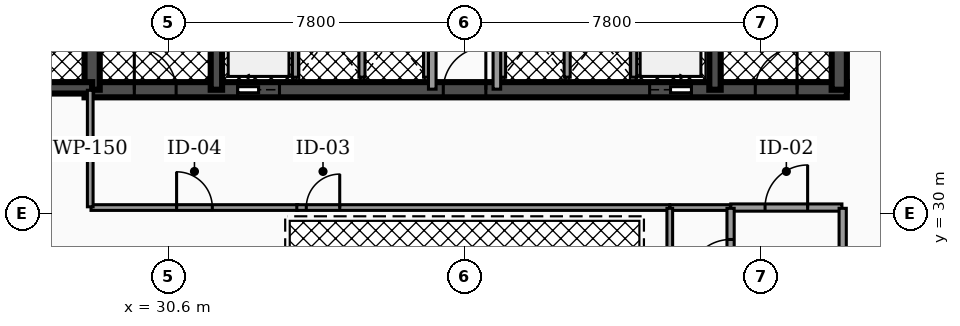
"""IFC4 building model, lengths in metres.
Left out: names, types, materials, properties, quantities, classifications, styles, units other than length and angle.
Written with IfcOpenShell. Run it as: python <this file> out.ifc"""

import sys

from ifc_helpers import new_model, si_unit, direction, frame, frame_2d, origin, place, context, subcontext, project, spatial, rectangle, extrude, element, fill, save


model = new_model("IFC4")
c1 = context("Model", 3, precision=1e-05, world=origin(), true_north=direction((0.0, 1.0)))
c2 = subcontext(c1, "Body", "Model", "MODEL_VIEW")
j1 = project(units=[si_unit("LENGTHUNIT", "METRE"), si_unit("PLANEANGLEUNIT", "RADIAN")], contexts=[c1])
p1 = place(None, origin())
s1 = spatial("IfcSite", under=j1, at=p1, CompositionType="ELEMENT")
p2 = place(p1, origin())
s2 = spatial("IfcBuilding", under=s1, at=p2, CompositionType="ELEMENT")
p3 = place(p2, frame((0.0, 0.0, 76.5)))
s3 = spatial("IfcBuildingStorey", under=s2, at=p3, CompositionType="ELEMENT", Elevation=76.5)
p4 = place(p3, frame((28.4, 33.25, 0.0), z_axis=(0.0, 0.0, 1.0), x_axis=(1.0, 0.0, 0.0)))
e1 = element("IfcWall", 1, at=p4, inside=s3, PredefinedType="SHEAR", context=c2, shape_type="SweptSolid", body=[
    extrude(rectangle(XDim=20.06, YDim=0.4, at=frame_2d((10.03, 0.0))), origin(), (0.0, 0.0, 1.0), 3.82),
])
p5 = place(p4, frame((4.03, 0.0, 0.0)))
e2 = element("IfcOpeningElement", 2, at=p5, cuts=e1, PredefinedType="OPENING", context=c2, shape_type="SweptSolid", body=[
    extrude(rectangle(XDim=1.1, YDim=2.15, at=frame_2d((0.55, 1.075))), frame((0.0, 0.21, 0.0), z_axis=(0.0, -1.0, 0.0), x_axis=(1.0, 0.0, 0.0)), (0.0, 0.0, 1.0), 0.42),
])
p6 = place(p4, frame((14.87, 0.0, 0.0)))
e3 = element("IfcOpeningElement", 3, at=p6, cuts=e1, PredefinedType="OPENING", context=c2, shape_type="SweptSolid", body=[
    extrude(rectangle(XDim=1.1, YDim=2.15, at=frame_2d((0.55, 1.075))), frame((0.0, 0.21, 0.0), z_axis=(0.0, -1.0, 0.0), x_axis=(1.0, 0.0, 0.0)), (0.0, 0.0, 1.0), 0.42),
])
p7 = place(p4, frame((1.31, 0.0, 0.0)))
e4 = element("IfcOpeningElement", 4, at=p7, cuts=e1, PredefinedType="OPENING", context=c2, shape_type="SweptSolid", body=[
    extrude(rectangle(XDim=1.1, YDim=2.2, at=frame_2d((0.55, 1.1))), frame((0.0, 0.21, 0.0), z_axis=(0.0, -1.0, 0.0), x_axis=(1.0, 0.0, 0.0)), (0.0, 0.0, 1.0), 0.42),
])
p8 = place(p4, frame((9.44, 0.0, 0.0)))
e5 = element("IfcOpeningElement", 5, at=p8, cuts=e1, PredefinedType="OPENING", context=c2, shape_type="SweptSolid", body=[
    extrude(rectangle(XDim=1.12, YDim=2.05, at=frame_2d((0.56, 1.025))), frame((0.0, 0.21, 0.0), z_axis=(0.0, -1.0, 0.0), x_axis=(1.0, 0.0, 0.0)), (0.0, 0.0, 1.0), 0.42),
])
p9 = place(p4, frame((17.65, 0.0, 0.0)))
e6 = element("IfcOpeningElement", 6, at=p9, cuts=e1, PredefinedType="OPENING", context=c2, shape_type="SweptSolid", body=[
    extrude(rectangle(XDim=1.1, YDim=2.2, at=frame_2d((0.55, 1.1))), frame((0.0, 0.21, 0.0), z_axis=(0.0, -1.0, 0.0), x_axis=(1.0, 0.0, 0.0)), (0.0, 0.0, 1.0), 0.42),
])
p10 = place(p3, frame((28.6, 33.25, 0.0), z_axis=(0.0, 0.0, 1.0), x_axis=(0.0, 1.0, 0.0)))
e7 = element("IfcWall", 7, at=p10, inside=s3, PredefinedType="SHEAR", context=c2, shape_type="SweptSolid", body=[
    extrude(rectangle(XDim=10.2, YDim=0.4, at=frame_2d((5.1, 0.0))), origin(), (0.0, 0.0, 1.0), 3.82),
])
for number, where, z_axis, x_axis in (
    (8, (31.87, 33.25, 0.0), (0.0, 0.0, 1.0), (0.0, 1.0, 0.0)),
    (9, (44.99, 33.25, 0.0), (0.0, 0.0, 1.0), (0.0, 1.0, 0.0)),
):
    element("IfcWall", number, at=place(p3, frame(where, z_axis=z_axis, x_axis=x_axis)), inside=s3, PredefinedType="SHEAR", context=c2, shape_type="SweptSolid", body=[
        extrude(rectangle(XDim=10.2, YDim=0.3, at=frame_2d((5.1, 0.0))), origin(), (0.0, 0.0, 1.0), 3.82),
    ])
p11 = place(p3, frame((48.26, 33.25, 0.0), z_axis=(0.0, 0.0, 1.0), x_axis=(0.0, 1.0, 0.0)))
e10 = element("IfcWall", 10, at=p11, inside=s3, PredefinedType="SHEAR", context=c2, shape_type="SweptSolid", body=[
    extrude(rectangle(XDim=10.2, YDim=0.4, at=frame_2d((5.1, 0.0))), origin(), (0.0, 0.0, 1.0), 3.82),
])
p12 = place(p3, frame((25.08, 33.3, 0.0), z_axis=(0.0, 0.0, 1.0), x_axis=(1.0, 0.0, 0.0)))
e11 = element("IfcWall", 11, at=p12, inside=s3, PredefinedType="SHEAR", context=c2, shape_type="SweptSolid", body=[
    extrude(rectangle(XDim=3.52, YDim=0.3, at=frame_2d((1.76, 0.0))), origin(), (0.0, 0.0, 1.0), 3.82),
])
p13 = place(p12, frame((1.335, 0.0, 0.0)))
e12 = element("IfcOpeningElement", 12, at=p13, cuts=e11, PredefinedType="OPENING", context=c2, shape_type="SweptSolid", body=[
    extrude(rectangle(XDim=0.95, YDim=2.2, at=frame_2d((0.475, 1.1))), frame((0.0, 0.16, 0.0), z_axis=(0.0, -1.0, 0.0), x_axis=(1.0, 0.0, 0.0)), (0.0, 0.0, 1.0), 0.32),
])
for number, where, z_axis, x_axis in (
    (13, (33.95, 33.58, 0.0), (0.0, 0.0, 1.0), (0.0, 1.0, 0.0)),
    (14, (42.85, 33.58, 0.0), (0.0, 0.0, 1.0), (0.0, 1.0, 0.0)),
):
    element("IfcWall", number, at=place(p3, frame(where, z_axis=z_axis, x_axis=x_axis)), inside=s3, PredefinedType="SOLIDWALL", context=c2, shape_type="SweptSolid", body=[
        extrude(rectangle(XDim=2.45, YDim=0.16, at=frame_2d((1.225, 0.0))), origin(), (0.0, 0.0, 1.0), 2.792),
    ])
for number, where, z_axis, x_axis in (
    (15, (35.7, 33.58, 0.0), (0.0, 0.0, 1.0), (0.0, 1.0, 0.0)),
    (16, (37.4, 33.58, 0.0), (0.0, 0.0, 1.0), (0.0, 1.0, 0.0)),
    (17, (39.4, 33.58, 0.0), (0.0, 0.0, 1.0), (0.0, 1.0, 0.0)),
    (18, (41.1, 33.58, 0.0), (0.0, 0.0, 1.0), (0.0, 1.0, 0.0)),
):
    element("IfcWall", number, at=place(p3, frame(where, z_axis=z_axis, x_axis=x_axis)), inside=s3, PredefinedType="SOLIDWALL", context=c2, shape_type="SweptSolid", body=[
        extrude(rectangle(XDim=2.25, YDim=0.16, at=frame_2d((1.125, 0.0))), origin(), (0.0, 0.0, 1.0), 2.792),
    ])
p14 = place(p3, frame((37.55, 33.265, 0.0), z_axis=(0.0, 0.0, 1.0), x_axis=(0.0, 1.0, 0.0)))
e19 = element("IfcWall", 19, at=p14, inside=s3, PredefinedType="PARTITIONING", context=c2, shape_type="SweptSolid", body=[
    extrude(rectangle(XDim=4.265, YDim=0.2, at=frame_2d((2.133, 0.0))), origin(), (0.0, 0.0, 1.0), 2.777),
])
p15 = place(p14, frame((3.093, 0.0, 0.0)))
e20 = element("IfcOpeningElement", 20, at=p15, cuts=e19, PredefinedType="OPENING", context=c2, shape_type="SweptSolid", body=[
    extrude(rectangle(XDim=0.88, YDim=2.05, at=frame_2d((0.44, 1.025))), frame((0.0, 0.11, 0.0), z_axis=(0.0, -1.0, 0.0), x_axis=(1.0, 0.0, 0.0)), (0.0, 0.0, 1.0), 0.22),
])
p16 = place(p3, frame((39.25, 33.265, 0.0), z_axis=(0.0, 0.0, 1.0), x_axis=(0.0, 1.0, 0.0)))
e21 = element("IfcWall", 21, at=p16, inside=s3, PredefinedType="PARTITIONING", context=c2, shape_type="SweptSolid", body=[
    extrude(rectangle(XDim=4.265, YDim=0.2, at=frame_2d((2.133, 0.0))), origin(), (0.0, 0.0, 1.0), 2.777),
])
p17 = place(p16, frame((3.093, 0.0, 0.0)))
e22 = element("IfcOpeningElement", 22, at=p17, cuts=e21, PredefinedType="OPENING", context=c2, shape_type="SweptSolid", body=[
    extrude(rectangle(XDim=0.88, YDim=2.05, at=frame_2d((0.44, 1.025))), frame((0.0, 0.11, 0.0), z_axis=(0.0, -1.0, 0.0), x_axis=(1.0, 0.0, 0.0)), (0.0, 0.0, 1.0), 0.22),
])
p18 = place(p3, frame((45.405, 30.15, 0.0), z_axis=(0.0, 0.0, 1.0), x_axis=(1.0, 0.0, 0.0)))
e23 = element("IfcWall", 23, at=p18, inside=s3, PredefinedType="PARTITIONING", context=c2, shape_type="SweptSolid", body=[
    extrude(rectangle(XDim=2.925, YDim=0.19, at=frame_2d((1.462, 0.0))), origin(), (0.0, 0.0, 1.0), 2.777),
])
p19 = place(p18, frame((0.903, 0.0, 0.0)))
e24 = element("IfcOpeningElement", 24, at=p19, cuts=e23, PredefinedType="OPENING", context=c2, shape_type="SweptSolid", body=[
    extrude(rectangle(XDim=1.12, YDim=2.05, at=frame_2d((0.56, 1.025))), frame((0.0, 0.105, 0.0), z_axis=(0.0, -1.0, 0.0), x_axis=(1.0, 0.0, 0.0)), (0.0, 0.0, 1.0), 0.21),
])
p20 = place(p3, frame((43.805, 30.15, 0.0), z_axis=(0.0, 0.0, 1.0), x_axis=(1.0, 0.0, 0.0)))
e25 = element("IfcWall", 25, at=p20, inside=s3, PredefinedType="PARTITIONING", context=c2, shape_type="SweptSolid", body=[
    extrude(rectangle(XDim=1.59, YDim=0.15, at=frame_2d((0.795, 0.0))), origin(), (0.0, 0.0, 1.0), 2.777),
])
p21 = place(p3, frame((28.57, 30.15, 0.0), z_axis=(0.0, 0.0, 1.0), x_axis=(1.0, 0.0, 0.0)))
e26 = element("IfcWall", 26, at=p21, inside=s3, PredefinedType="PARTITIONING", context=c2, shape_type="SweptSolid", body=[
    extrude(rectangle(XDim=5.445, YDim=0.15, at=frame_2d((2.722, 0.0))), origin(), (0.0, 0.0, 1.0), 2.777),
])
p22 = place(p21, frame((2.252, 0.0, 0.0)))
e27 = element("IfcOpeningElement", 27, at=p22, cuts=e26, PredefinedType="OPENING", context=c2, shape_type="SweptSolid", body=[
    extrude(rectangle(XDim=0.94, YDim=2.05, at=frame_2d((0.47, 1.025))), frame((0.0, 0.085, 0.0), z_axis=(0.0, -1.0, 0.0), x_axis=(1.0, 0.0, 0.0)), (0.0, 0.0, 1.0), 0.17),
])
p23 = place(p3, frame((28.55, 30.17, 0.0), z_axis=(0.0, 0.0, 1.0), x_axis=(0.0, 1.0, 0.0)))
e28 = element("IfcWall", 28, at=p23, inside=s3, PredefinedType="PARTITIONING", context=c2, shape_type="SweptSolid", body=[
    extrude(rectangle(XDim=3.065, YDim=0.15, at=frame_2d((1.533, 0.0))), origin(), (0.0, 0.0, 1.0), 2.777),
])
p24 = place(p3, frame((33.985, 30.15, 0.0), z_axis=(0.0, 0.0, 1.0), x_axis=(1.0, 0.0, 0.0)))
e29 = element("IfcWall", 29, at=p24, inside=s3, PredefinedType="PARTITIONING", context=c2, shape_type="SweptSolid", body=[
    extrude(rectangle(XDim=9.81, YDim=0.15, at=frame_2d((4.905, 0.0))), origin(), (0.0, 0.0, 1.0), 2.777),
])
p25 = place(p24, frame((0.25, 0.0, 0.0)))
e30 = element("IfcOpeningElement", 30, at=p25, cuts=e29, PredefinedType="OPENING", context=c2, shape_type="SweptSolid", body=[
    extrude(rectangle(XDim=0.88, YDim=2.05, at=frame_2d((0.44, 1.025))), frame((0.0, 0.085, 0.0), z_axis=(0.0, -1.0, 0.0), x_axis=(1.0, 0.0, 0.0)), (0.0, 0.0, 1.0), 0.17),
])
p26 = place(p3, frame((45.4, 27.37, 0.0), z_axis=(0.0, 0.0, 1.0), x_axis=(0.0, 1.0, 0.0)))
e31 = element("IfcWall", 31, at=p26, inside=s3, PredefinedType="PARTITIONING", context=c2, shape_type="SweptSolid", body=[
    extrude(rectangle(XDim=2.76, YDim=0.19, at=frame_2d((1.38, 0.0))), origin(), (0.0, 0.0, 1.0), 2.777),
])
p27 = place(p26, frame((0.82, 0.0, 0.0)))
e32 = element("IfcOpeningElement", 32, at=p27, cuts=e31, PredefinedType="OPENING", context=c2, shape_type="SweptSolid", body=[
    extrude(rectangle(XDim=1.12, YDim=2.05, at=frame_2d((0.56, 1.025))), frame((0.0, 0.105, 0.0), z_axis=(0.0, -1.0, 0.0), x_axis=(1.0, 0.0, 0.0)), (0.0, 0.0, 1.0), 0.21),
])
p28 = place(p3, frame((48.35, 27.37, 0.0), z_axis=(0.0, 0.0, 1.0), x_axis=(0.0, 1.0, 0.0)))
e33 = element("IfcWall", 33, at=p28, inside=s3, PredefinedType="PARTITIONING", context=c2, shape_type="SweptSolid", body=[
    extrude(rectangle(XDim=2.76, YDim=0.19, at=frame_2d((1.38, 0.0))), origin(), (0.0, 0.0, 1.0), 2.777),
])
p29 = place(p3, frame((43.8, 23.62, 0.0), z_axis=(0.0, 0.0, 1.0), x_axis=(0.0, 1.0, 0.0)))
e34 = element("IfcWall", 34, at=p29, inside=s3, PredefinedType="PARTITIONING", context=c2, shape_type="SweptSolid", body=[
    extrude(rectangle(XDim=6.51, YDim=0.15, at=frame_2d((3.255, 0.0))), origin(), (0.0, 0.0, 1.0), 2.777),
])
p30 = place(p5, origin())
e35 = element("IfcDoor", 35, at=p30, inside=s3, OperationType="SLIDING_TO_LEFT", PredefinedType="DOOR", context=c2, shape_type="SweptSolid", body=[
    extrude(rectangle(XDim=1.1, YDim=2.15, at=frame_2d((0.55, 1.075))), frame((0.0, 0.025, 0.0), z_axis=(0.0, -1.0, 0.0), x_axis=(1.0, 0.0, 0.0)), (0.0, 0.0, 1.0), 0.05),
])
fill(e2, e35)
p31 = place(p6, origin())
e36 = element("IfcDoor", 36, at=p31, inside=s3, OperationType="SLIDING_TO_RIGHT", PredefinedType="DOOR", context=c2, shape_type="SweptSolid", body=[
    extrude(rectangle(XDim=1.1, YDim=2.15, at=frame_2d((0.55, 1.075))), frame((0.0, 0.025, 0.0), z_axis=(0.0, -1.0, 0.0), x_axis=(1.0, 0.0, 0.0)), (0.0, 0.0, 1.0), 0.05),
])
fill(e3, e36)
p32 = place(p7, origin())
e37 = element("IfcDoor", 37, at=p32, inside=s3, OperationType="SINGLE_SWING_LEFT", PredefinedType="DOOR", context=c2, shape_type="SweptSolid", body=[
    extrude(rectangle(XDim=1.1, YDim=2.2, at=frame_2d((0.55, 1.1))), frame((0.0, 0.025, 0.0), z_axis=(0.0, -1.0, 0.0), x_axis=(1.0, 0.0, 0.0)), (0.0, 0.0, 1.0), 0.05),
])
fill(e4, e37)
p33 = place(p8, origin())
e38 = element("IfcDoor", 38, at=p33, inside=s3, OperationType="SINGLE_SWING_RIGHT", PredefinedType="DOOR", context=c2, shape_type="SweptSolid", body=[
    extrude(rectangle(XDim=1.12, YDim=2.05, at=frame_2d((0.56, 1.025))), frame((0.0, 0.025, 0.0), z_axis=(0.0, -1.0, 0.0), x_axis=(1.0, 0.0, 0.0)), (0.0, 0.0, 1.0), 0.05),
])
fill(e5, e38)
p34 = place(p9, origin())
e39 = element("IfcDoor", 39, at=p34, inside=s3, OperationType="SINGLE_SWING_RIGHT", PredefinedType="DOOR", context=c2, shape_type="SweptSolid", body=[
    extrude(rectangle(XDim=1.1, YDim=2.2, at=frame_2d((0.55, 1.1))), frame((0.0, 0.025, 0.0), z_axis=(0.0, -1.0, 0.0), x_axis=(1.0, 0.0, 0.0)), (0.0, 0.0, 1.0), 0.05),
])
fill(e6, e39)
p35 = place(p19, origin())
e40 = element("IfcDoor", 40, at=p35, inside=s3, OperationType="SINGLE_SWING_RIGHT", PredefinedType="DOOR", context=c2, shape_type="SweptSolid", body=[
    extrude(rectangle(XDim=1.12, YDim=2.05, at=frame_2d((0.56, 1.025))), frame((0.0, 0.025, 0.0), z_axis=(0.0, -1.0, 0.0), x_axis=(1.0, 0.0, 0.0)), (0.0, 0.0, 1.0), 0.05),
])
fill(e24, e40)
p36 = place(p22, origin())
e41 = element("IfcDoor", 41, at=p36, inside=s3, OperationType="SINGLE_SWING_LEFT", PredefinedType="DOOR", context=c2, shape_type="SweptSolid", body=[
    extrude(rectangle(XDim=0.94, YDim=2.05, at=frame_2d((0.47, 1.025))), frame((0.0, 0.025, 0.0), z_axis=(0.0, -1.0, 0.0), x_axis=(1.0, 0.0, 0.0)), (0.0, 0.0, 1.0), 0.05),
])
fill(e27, e41)
p37 = place(p25, origin())
e42 = element("IfcDoor", 42, at=p37, inside=s3, OperationType="SINGLE_SWING_RIGHT", PredefinedType="DOOR", context=c2, shape_type="SweptSolid", body=[
    extrude(rectangle(XDim=0.88, YDim=2.05, at=frame_2d((0.44, 1.025))), frame((0.0, 0.025, 0.0), z_axis=(0.0, -1.0, 0.0), x_axis=(1.0, 0.0, 0.0)), (0.0, 0.0, 1.0), 0.05),
])
fill(e30, e42)
p38 = place(p27, origin())
e43 = element("IfcDoor", 43, at=p38, inside=s3, OperationType="SINGLE_SWING_LEFT", PredefinedType="DOOR", context=c2, shape_type="SweptSolid", body=[
    extrude(rectangle(XDim=1.12, YDim=2.05, at=frame_2d((0.56, 1.025))), frame((0.0, 0.025, 0.0), z_axis=(0.0, -1.0, 0.0), x_axis=(1.0, 0.0, 0.0)), (0.0, 0.0, 1.0), 0.05),
])
fill(e32, e43)
save(model, sys.argv[1])
